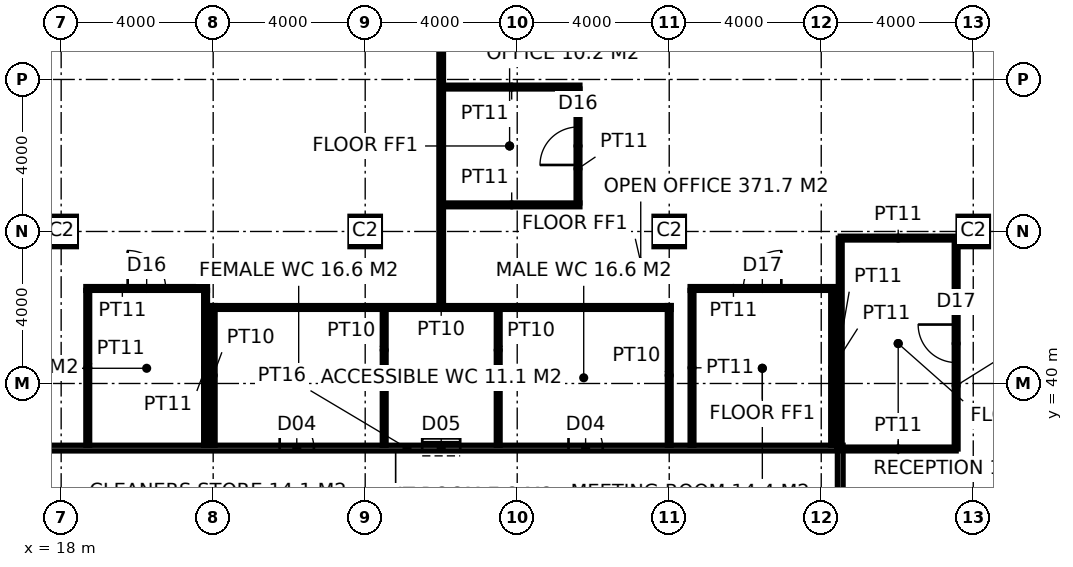
"""IFC4 building model, lengths in metres.
Left out: names, types, materials, properties, quantities, classifications, styles, units other than length and angle.
Written with IfcOpenShell. Run it as: python <this file> out.ifc"""

import sys

from ifc_helpers import new_model, si_unit, direction, frame, frame_2d, origin, origin_2d, place, context, subcontext, project, spatial, rectangle, hollow_rectangle, extrude, element, fill, save


model = new_model("IFC4")
c1 = context("Model", 3, precision=1e-05, world=origin(), true_north=direction((0.0, 1.0)))
c2 = subcontext(c1, "Body", "Model", "MODEL_VIEW")
j1 = project(units=[si_unit("LENGTHUNIT", "METRE"), si_unit("PLANEANGLEUNIT", "RADIAN")], contexts=[c1])
p1 = place(None, origin())
s1 = spatial("IfcSite", under=j1, at=p1, CompositionType="ELEMENT")
p2 = place(p1, origin())
s2 = spatial("IfcBuilding", under=s1, at=p2, CompositionType="ELEMENT")
p3 = place(p2, frame((0.0, 0.0, 226.2)))
s3 = spatial("IfcBuildingStorey", under=s2, at=p3, CompositionType="ELEMENT", Elevation=226.2)
for number, where, z_axis, x_axis in (
    (1, (18.0, 44.0, 0.0), (0.0, 0.0, 1.0), (1.0, 0.0, 0.0)),
    (2, (26.0, 44.0, 0.0), (0.0, 0.0, 1.0), (1.0, 0.0, 0.0)),
    (3, (34.0, 44.0, 0.0), (0.0, 0.0, 1.0), (1.0, 0.0, 0.0)),
    (4, (42.0, 44.0, 0.0), (0.0, 0.0, 1.0), (1.0, 0.0, 0.0)),
):
    element("IfcColumn", number, at=place(p3, frame(where, z_axis=z_axis, x_axis=x_axis)), inside=s3, PredefinedType="COLUMN", context=c2, shape_type="SweptSolid", body=[
        extrude(hollow_rectangle(XDim=0.8, YDim=0.8, WallThickness=0.08, at=origin_2d()), origin(), (0.0, 0.0, 1.0), 4.0),
    ])
p4 = place(p3, frame((38.5, 15.625, 0.0), z_axis=(0.0, 0.0, 1.0), x_axis=(0.0, 1.0, 0.0)))
e5 = element("IfcWall", 5, at=p4, inside=s3, PredefinedType="PARTITIONING", context=c2, shape_type="SweptSolid", body=[
    extrude(rectangle(XDim=22.75, YDim=0.15, at=frame_2d((11.375, 0.0))), origin(), (0.0, 0.0, 1.0), 3.85),
])
p5 = place(p4, frame((6.974, 0.0, 0.0)))
e6 = element("IfcOpeningElement", 6, at=p5, cuts=e5, PredefinedType="OPENING", context=c2, shape_type="SweptSolid", body=[
    extrude(rectangle(XDim=1.8, YDim=2.4, at=frame_2d((0.9, 1.2))), frame((0.0, 0.085, 0.0), z_axis=(0.0, -1.0, 0.0), x_axis=(1.0, 0.0, 0.0)), (0.0, 0.0, 1.0), 0.17),
])
p6 = place(p4, frame((18.226, 0.0, 0.0)))
e7 = element("IfcOpeningElement", 7, at=p6, cuts=e5, PredefinedType="OPENING", context=c2, shape_type="SweptSolid", body=[
    extrude(rectangle(XDim=1.8, YDim=2.4, at=frame_2d((0.9, 1.2))), frame((0.0, 0.085, 0.0), z_axis=(0.0, -1.0, 0.0), x_axis=(1.0, 0.0, 0.0)), (0.0, 0.0, 1.0), 0.17),
])
p7 = place(p3, frame((15.775, 38.3, 0.0), z_axis=(0.0, 0.0, 1.0), x_axis=(1.0, 0.0, 0.0)))
e8 = element("IfcWall", 8, at=p7, inside=s3, PredefinedType="PARTITIONING", context=c2, shape_type="SweptSolid", body=[
    extrude(rectangle(XDim=22.65, YDim=0.15, at=frame_2d((11.325, 0.0))), origin(), (0.0, 0.0, 1.0), 3.85),
])
p8 = place(p7, frame((7.975, 0.0, 0.0)))
e9 = element("IfcOpeningElement", 9, at=p8, cuts=e8, PredefinedType="OPENING", context=c2, shape_type="SweptSolid", body=[
    extrude(rectangle(XDim=0.9, YDim=2.1, at=frame_2d((0.45, 1.05))), frame((0.0, 0.085, 0.0), z_axis=(0.0, -1.0, 0.0), x_axis=(1.0, 0.0, 0.0)), (0.0, 0.0, 1.0), 0.17),
])
p9 = place(p7, frame((11.725, 0.0, 0.0)))
e10 = element("IfcOpeningElement", 10, at=p9, cuts=e8, PredefinedType="OPENING", context=c2, shape_type="SweptSolid", body=[
    extrude(rectangle(XDim=1.0, YDim=2.1, at=frame_2d((0.5, 1.05))), frame((0.0, 0.085, 0.0), z_axis=(0.0, -1.0, 0.0), x_axis=(1.0, 0.0, 0.0)), (0.0, 0.0, 1.0), 0.17),
])
p10 = place(p7, frame((15.575, 0.0, 0.0)))
e11 = element("IfcOpeningElement", 11, at=p10, cuts=e8, PredefinedType="OPENING", context=c2, shape_type="SweptSolid", body=[
    extrude(rectangle(XDim=0.9, YDim=2.1, at=frame_2d((0.45, 1.05))), frame((0.0, 0.085, 0.0), z_axis=(0.0, -1.0, 0.0), x_axis=(1.0, 0.0, 0.0)), (0.0, 0.0, 1.0), 0.17),
])
for number, where, z_axis, x_axis in (
    (12, (22.0, 38.375, 0.0), (0.0, 0.0, 1.0), (0.0, 1.0, 0.0)),
    (13, (34.0, 38.375, 0.0), (0.0, 0.0, 1.0), (0.0, 1.0, 0.0)),
):
    element("IfcWall", number, at=place(p3, frame(where, z_axis=z_axis, x_axis=x_axis)), inside=s3, PredefinedType="PARTITIONING", context=c2, shape_type="SweptSolid", body=[
        extrude(rectangle(XDim=3.675, YDim=0.1, at=frame_2d((1.837, 0.0))), origin(), (0.0, 0.0, 1.0), 2.95),
    ])
p11 = place(p3, frame((21.95, 42.0, 0.0), z_axis=(0.0, 0.0, 1.0), x_axis=(1.0, 0.0, 0.0)))
e14 = element("IfcWall", 14, at=p11, inside=s3, PredefinedType="PARTITIONING", context=c2, shape_type="SweptSolid", body=[
    extrude(rectangle(XDim=12.1, YDim=0.1, at=frame_2d((6.05, 0.0))), origin(), (0.0, 0.0, 1.0), 3.85),
])
for number, where, z_axis, x_axis in (
    (15, (26.5, 38.375, 0.0), (0.0, 0.0, 1.0), (0.0, 1.0, 0.0)),
    (16, (29.5, 38.375, 0.0), (0.0, 0.0, 1.0), (0.0, 1.0, 0.0)),
):
    element("IfcWall", number, at=place(p3, frame(where, z_axis=z_axis, x_axis=x_axis)), inside=s3, PredefinedType="PARTITIONING", context=c2, shape_type="SweptSolid", body=[
        extrude(rectangle(XDim=3.575, YDim=0.1, at=frame_2d((1.788, 0.0))), origin(), (0.0, 0.0, 1.0), 3.85),
    ])
p12 = place(p3, frame((28.0, 42.05, 0.0), z_axis=(0.0, 0.0, 1.0), x_axis=(0.0, 1.0, 0.0)))
e17 = element("IfcWall", 17, at=p12, inside=s3, PredefinedType="PARTITIONING", context=c2, shape_type="SweptSolid", body=[
    extrude(rectangle(XDim=13.65, YDim=0.12, at=frame_2d((6.825, 0.0))), origin(), (0.0, 0.0, 1.0), 3.85),
])
p13 = place(p3, frame((18.65, 42.5, 0.0), z_axis=(0.0, 0.0, 1.0), x_axis=(1.0, 0.0, 0.0)))
e18 = element("IfcWall", 18, at=p13, inside=s3, PredefinedType="PARTITIONING", context=c2, shape_type="SweptSolid", body=[
    extrude(rectangle(XDim=3.2, YDim=0.1, at=frame_2d((1.6, 0.0))), origin(), (0.0, 0.0, 1.0), 3.85),
])
p14 = place(p13, frame((1.1, 0.0, 0.0)))
e19 = element("IfcOpeningElement", 19, at=p14, cuts=e18, PredefinedType="OPENING", context=c2, shape_type="SweptSolid", body=[
    extrude(rectangle(XDim=1.0, YDim=2.2, at=frame_2d((0.5, 1.1))), frame((0.0, 0.06, 0.0), z_axis=(0.0, -1.0, 0.0), x_axis=(1.0, 0.0, 0.0)), (0.0, 0.0, 1.0), 0.12),
])
p15 = place(p3, frame((34.55, 42.5, 0.0), z_axis=(0.0, 0.0, 1.0), x_axis=(1.0, 0.0, 0.0)))
e20 = element("IfcWall", 20, at=p15, inside=s3, PredefinedType="PARTITIONING", context=c2, shape_type="SweptSolid", body=[
    extrude(rectangle(XDim=3.8, YDim=0.1, at=frame_2d((1.9, 0.0))), origin(), (0.0, 0.0, 1.0), 3.85),
])
p16 = place(p15, frame((1.4, 0.0, 0.0)))
e21 = element("IfcOpeningElement", 21, at=p16, cuts=e20, PredefinedType="OPENING", context=c2, shape_type="SweptSolid", body=[
    extrude(rectangle(XDim=1.0, YDim=2.2, at=frame_2d((0.5, 1.1))), frame((0.0, 0.06, 0.0), z_axis=(0.0, -1.0, 0.0), x_axis=(1.0, 0.0, 0.0)), (0.0, 0.0, 1.0), 0.12),
])
for number, where, z_axis, x_axis in (
    (22, (28.06, 44.7, 0.0), (0.0, 0.0, 1.0), (1.0, 0.0, 0.0)),
    (23, (28.06, 47.8, 0.0), (0.0, 0.0, 1.0), (1.0, 0.0, 0.0)),
):
    element("IfcWall", number, at=place(p3, frame(where, z_axis=z_axis, x_axis=x_axis)), inside=s3, PredefinedType="PARTITIONING", context=c2, shape_type="SweptSolid", body=[
        extrude(rectangle(XDim=3.59, YDim=0.1, at=frame_2d((1.795, 0.0))), origin(), (0.0, 0.0, 1.0), 3.85),
    ])
p17 = place(p3, frame((18.7, 38.375, 0.0), z_axis=(0.0, 0.0, 1.0), x_axis=(0.0, 1.0, 0.0)))
e24 = element("IfcWall", 24, at=p17, inside=s3, PredefinedType="PARTITIONING", context=c2, shape_type="SweptSolid", body=[
    extrude(rectangle(XDim=4.075, YDim=0.1, at=frame_2d((2.038, 0.0))), origin(), (0.0, 0.0, 1.0), 3.85),
])
p18 = place(p3, frame((21.8, 38.375, 0.0), z_axis=(0.0, 0.0, 1.0), x_axis=(0.0, 1.0, 0.0)))
e25 = element("IfcWall", 25, at=p18, inside=s3, PredefinedType="PARTITIONING", context=c2, shape_type="SweptSolid", body=[
    extrude(rectangle(XDim=4.075, YDim=0.1, at=frame_2d((2.038, 0.0))), origin(), (0.0, 0.0, 1.0), 2.95),
])
p19 = place(p3, frame((31.6, 44.75, 0.0), z_axis=(0.0, 0.0, 1.0), x_axis=(0.0, 1.0, 0.0)))
e26 = element("IfcWall", 26, at=p19, inside=s3, PredefinedType="PARTITIONING", context=c2, shape_type="SweptSolid", body=[
    extrude(rectangle(XDim=3.0, YDim=0.1, at=frame_2d((1.5, 0.0))), origin(), (0.0, 0.0, 1.0), 3.85),
])
p20 = place(p19, frame((1.0, 0.0, 0.0)))
e27 = element("IfcOpeningElement", 27, at=p20, cuts=e26, PredefinedType="OPENING", context=c2, shape_type="SweptSolid", body=[
    extrude(rectangle(XDim=1.0, YDim=2.2, at=frame_2d((0.5, 1.1))), frame((0.0, 0.06, 0.0), z_axis=(0.0, -1.0, 0.0), x_axis=(1.0, 0.0, 0.0)), (0.0, 0.0, 1.0), 0.12),
])
p21 = place(p3, frame((34.6, 38.375, 0.0), z_axis=(0.0, 0.0, 1.0), x_axis=(0.0, 1.0, 0.0)))
e28 = element("IfcWall", 28, at=p21, inside=s3, PredefinedType="PARTITIONING", context=c2, shape_type="SweptSolid", body=[
    extrude(rectangle(XDim=4.075, YDim=0.1, at=frame_2d((2.038, 0.0))), origin(), (0.0, 0.0, 1.0), 3.85),
])
p22 = place(p3, frame((38.3, 38.375, 0.0), z_axis=(0.0, 0.0, 1.0), x_axis=(0.0, 1.0, 0.0)))
e29 = element("IfcWall", 29, at=p22, inside=s3, PredefinedType="PARTITIONING", context=c2, shape_type="SweptSolid", body=[
    extrude(rectangle(XDim=4.075, YDim=0.1, at=frame_2d((2.038, 0.0))), origin(), (0.0, 0.0, 1.0), 2.95),
])
p23 = place(p3, frame((38.5, 38.276, 0.0), z_axis=(0.0, 0.0, 1.0), x_axis=(1.0, 0.0, 0.0)))
e30 = element("IfcWall", 30, at=p23, inside=s3, PredefinedType="PARTITIONING", context=c2, shape_type="SweptSolid", body=[
    extrude(rectangle(XDim=3.05, YDim=0.1, at=frame_2d((1.525, 0.0))), origin(), (0.0, 0.0, 1.0), 3.85),
])
p24 = place(p3, frame((41.55, 38.276, 0.0), z_axis=(0.0, 0.0, 1.0), x_axis=(0.0, 1.0, 0.0)))
e31 = element("IfcWall", 31, at=p24, inside=s3, PredefinedType="PARTITIONING", context=c2, shape_type="SweptSolid", body=[
    extrude(rectangle(XDim=5.55, YDim=0.1, at=frame_2d((2.775, 0.0))), origin(), (0.0, 0.0, 1.0), 2.95),
])
p25 = place(p24, frame((2.275, 0.0, 0.0)))
e32 = element("IfcOpeningElement", 32, at=p25, cuts=e31, PredefinedType="OPENING", context=c2, shape_type="SweptSolid", body=[
    extrude(rectangle(XDim=1.0, YDim=2.2, at=frame_2d((0.5, 1.1))), frame((0.0, 0.06, 0.0), z_axis=(0.0, -1.0, 0.0), x_axis=(1.0, 0.0, 0.0)), (0.0, 0.0, 1.0), 0.12),
])
p26 = place(p3, frame((41.55, 43.826, 0.0), z_axis=(0.0, 0.0, 1.0), x_axis=(-1.0, 0.0, 0.0)))
e33 = element("IfcWall", 33, at=p26, inside=s3, PredefinedType="PARTITIONING", context=c2, shape_type="SweptSolid", body=[
    extrude(rectangle(XDim=3.05, YDim=0.1, at=frame_2d((1.525, 0.0))), origin(), (0.0, 0.0, 1.0), 3.85),
])
p27 = place(p3, frame((38.5, 43.826, 0.0), z_axis=(0.0, 0.0, 1.0), x_axis=(0.0, -1.0, 0.0)))
e34 = element("IfcWall", 34, at=p27, inside=s3, PredefinedType="PARTITIONING", context=c2, shape_type="SweptSolid", body=[
    extrude(rectangle(XDim=5.526, YDim=0.1, at=frame_2d((2.763, 0.0))), origin(), (0.0, 0.0, 1.0), 3.85),
])
p28 = place(p8, origin())
e35 = element("IfcDoor", 35, at=p28, inside=s3, OperationType="SINGLE_SWING_LEFT", PredefinedType="DOOR", context=c2, shape_type="SweptSolid", body=[
    extrude(rectangle(XDim=0.9, YDim=2.1, at=frame_2d((0.45, 1.05))), frame((0.0, 0.025, 0.0), z_axis=(0.0, -1.0, 0.0), x_axis=(1.0, 0.0, 0.0)), (0.0, 0.0, 1.0), 0.05),
])
fill(e9, e35)
p29 = place(p9, origin())
e36 = element("IfcDoor", 36, at=p29, inside=s3, OperationType="SLIDING_TO_LEFT", PredefinedType="DOOR", context=c2, shape_type="SweptSolid", body=[
    extrude(rectangle(XDim=1.0, YDim=2.1, at=frame_2d((0.5, 1.05))), frame((0.0, 0.025, 0.0), z_axis=(0.0, -1.0, 0.0), x_axis=(1.0, 0.0, 0.0)), (0.0, 0.0, 1.0), 0.05),
])
fill(e10, e36)
p30 = place(p10, origin())
e37 = element("IfcDoor", 37, at=p30, inside=s3, OperationType="SINGLE_SWING_LEFT", PredefinedType="DOOR", context=c2, shape_type="SweptSolid", body=[
    extrude(rectangle(XDim=0.9, YDim=2.1, at=frame_2d((0.45, 1.05))), frame((0.0, 0.025, 0.0), z_axis=(0.0, -1.0, 0.0), x_axis=(1.0, 0.0, 0.0)), (0.0, 0.0, 1.0), 0.05),
])
fill(e11, e37)
p31 = place(p14, origin())
e38 = element("IfcDoor", 38, at=p31, inside=s3, OperationType="SINGLE_SWING_LEFT", PredefinedType="DOOR", context=c2, shape_type="SweptSolid", body=[
    extrude(rectangle(XDim=1.0, YDim=2.2, at=frame_2d((0.5, 1.1))), frame((0.0, 0.025, 0.0), z_axis=(0.0, -1.0, 0.0), x_axis=(1.0, 0.0, 0.0)), (0.0, 0.0, 1.0), 0.05),
])
fill(e19, e38)
p32 = place(p16, origin())
e39 = element("IfcDoor", 39, at=p32, inside=s3, OperationType="SINGLE_SWING_RIGHT", PredefinedType="DOOR", context=c2, shape_type="SweptSolid", body=[
    extrude(rectangle(XDim=1.0, YDim=2.2, at=frame_2d((0.5, 1.1))), frame((0.0, 0.025, 0.0), z_axis=(0.0, -1.0, 0.0), x_axis=(1.0, 0.0, 0.0)), (0.0, 0.0, 1.0), 0.05),
])
fill(e21, e39)
p33 = place(p20, origin())
e40 = element("IfcDoor", 40, at=p33, inside=s3, OperationType="SINGLE_SWING_LEFT", PredefinedType="DOOR", context=c2, shape_type="SweptSolid", body=[
    extrude(rectangle(XDim=1.0, YDim=2.2, at=frame_2d((0.5, 1.1))), frame((0.0, 0.025, 0.0), z_axis=(0.0, -1.0, 0.0), x_axis=(1.0, 0.0, 0.0)), (0.0, 0.0, 1.0), 0.05),
])
fill(e27, e40)
p34 = place(p25, origin())
e41 = element("IfcDoor", 41, at=p34, inside=s3, OperationType="SINGLE_SWING_RIGHT", PredefinedType="DOOR", context=c2, shape_type="SweptSolid", body=[
    extrude(rectangle(XDim=1.0, YDim=2.2, at=frame_2d((0.5, 1.1))), frame((0.0, 0.025, 0.0), z_axis=(0.0, -1.0, 0.0), x_axis=(1.0, 0.0, 0.0)), (0.0, 0.0, 1.0), 0.05),
])
fill(e32, e41)
save(model, sys.argv[1])
